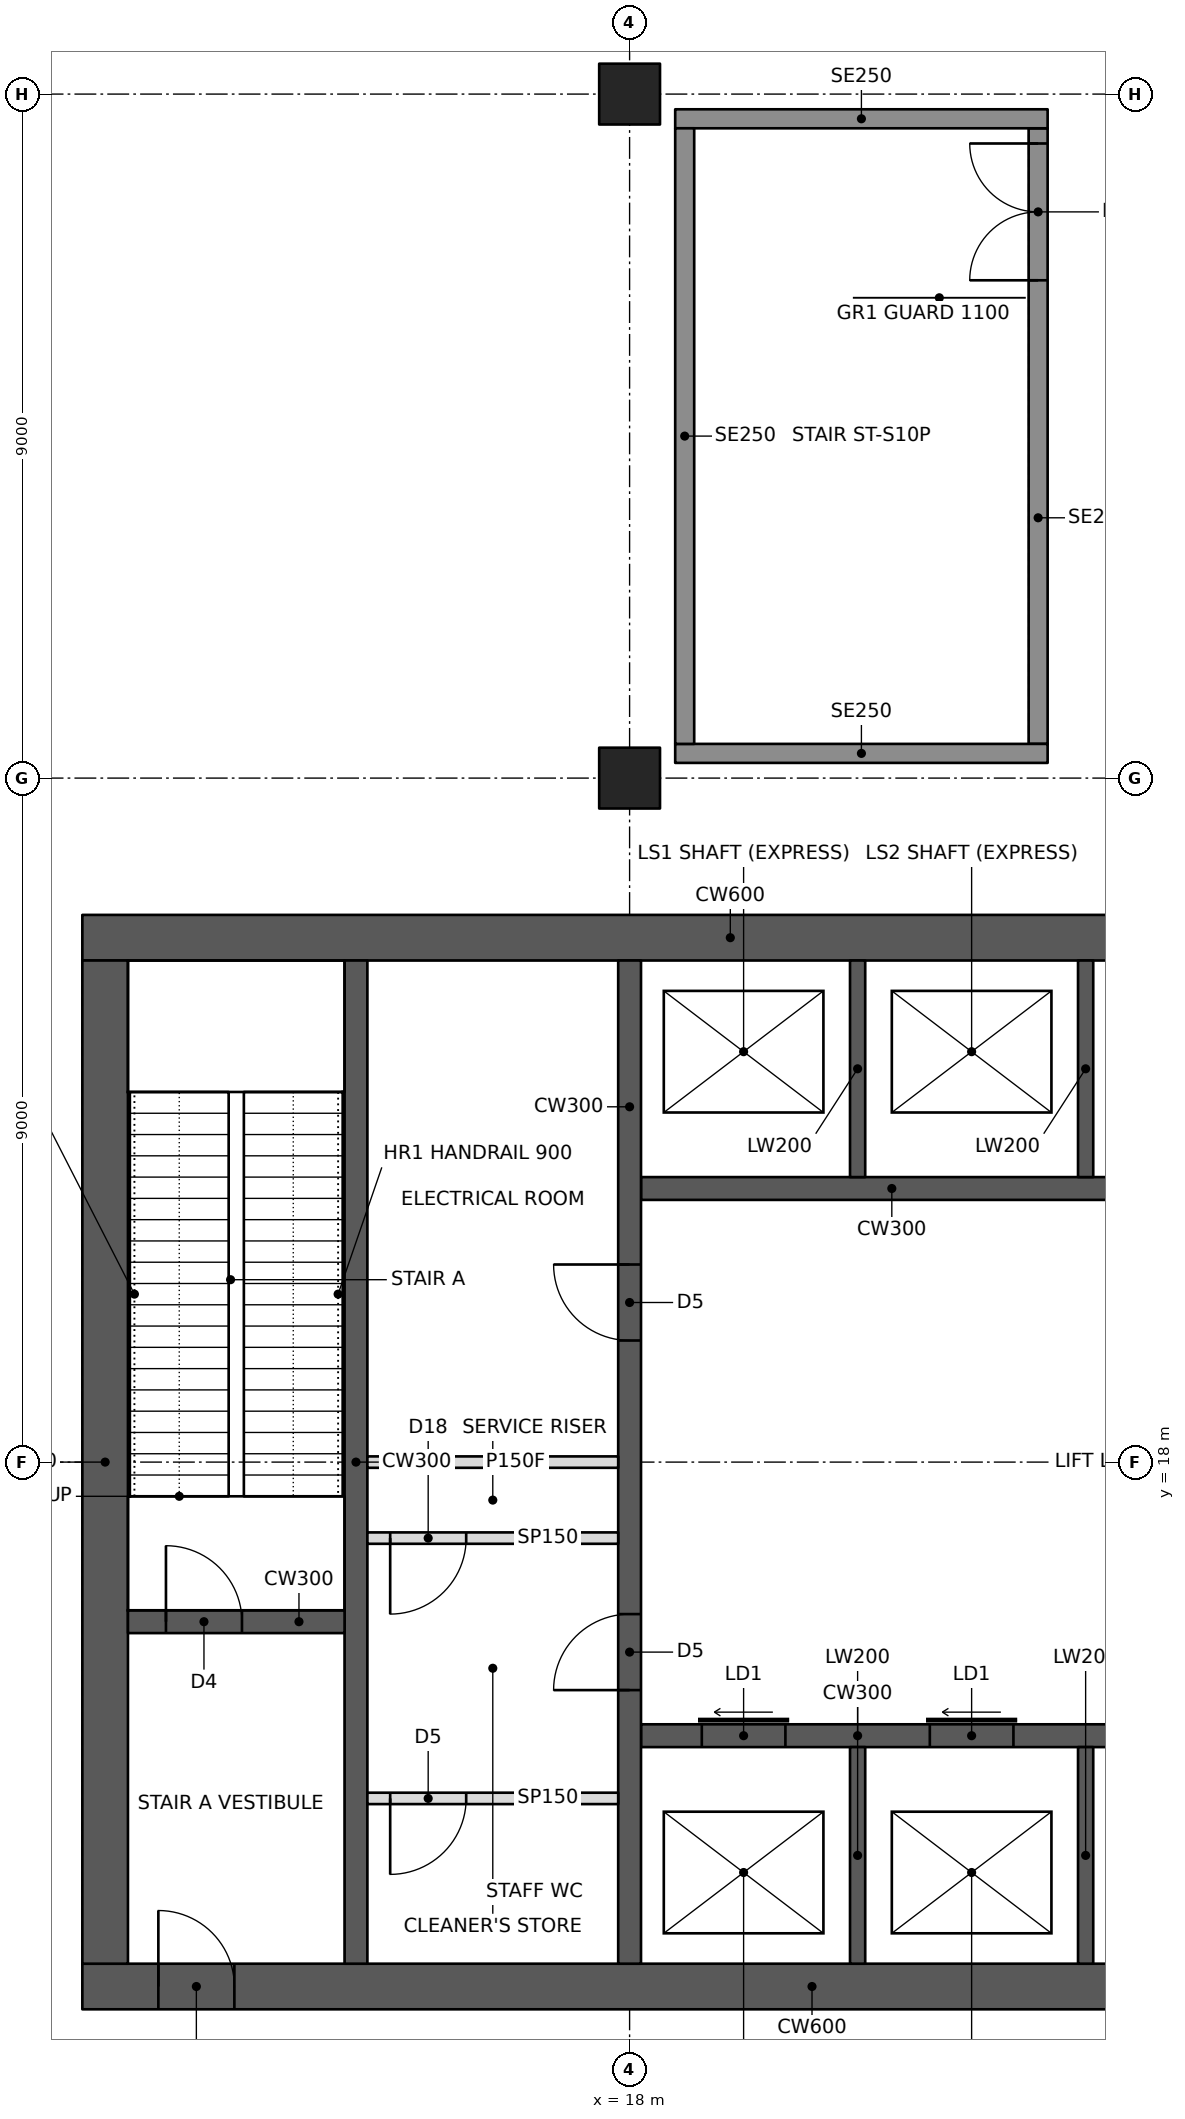
"""IFC4 building model, lengths in metres.
Left out: names, types, materials, properties, quantities, classifications, styles, units other than length and angle.
Written with IfcOpenShell. Run it as: python <this file> out.ifc"""

import sys

from ifc_helpers import new_model, si_unit, direction, frame, frame_2d, origin, origin_2d, place, context, subcontext, project, spatial, rectangle, hollow_rectangle, extrude, element, fill, save


model = new_model("IFC4")
c1 = context("Model", 3, precision=1e-05, world=origin(), true_north=direction((0.0, 1.0)))
c2 = subcontext(c1, "Body", "Model", "MODEL_VIEW")
j1 = project(units=[si_unit("LENGTHUNIT", "METRE"), si_unit("PLANEANGLEUNIT", "RADIAN")], contexts=[c1])
p1 = place(None, origin())
s1 = spatial("IfcSite", under=j1, at=p1, CompositionType="ELEMENT")
p2 = place(p1, origin())
s2 = spatial("IfcBuilding", under=s1, at=p2, CompositionType="ELEMENT")
p3 = place(p2, frame((0.0, 0.0, 16.0)))
s3 = spatial("IfcBuildingStorey", under=s2, at=p3, CompositionType="ELEMENT", Elevation=16.0)
for number, where, z_axis, x_axis in (
    (1, (18.0, 27.0, 0.0), (0.0, 0.0, 1.0), (1.0, 0.0, 0.0)),
    (2, (18.0, 36.0, 0.0), (0.0, 0.0, 1.0), (1.0, 0.0, 0.0)),
):
    element("IfcColumn", number, at=place(p3, frame(where, z_axis=z_axis, x_axis=x_axis)), inside=s3, PredefinedType="COLUMN", context=c2, shape_type="SweptSolid", body=[
        extrude(hollow_rectangle(XDim=0.8, YDim=0.8, WallThickness=0.1, at=origin_2d()), origin(), (0.0, 0.0, 1.0), 7.0),
    ])
p4 = place(p3, frame((10.8, 11.1, 0.0), z_axis=(0.0, 0.0, 1.0), x_axis=(1.0, 0.0, 0.0)))
e3 = element("IfcWall", 3, at=p4, inside=s3, PredefinedType="SHEAR", context=c2, shape_type="SweptSolid", body=[
    extrude(rectangle(XDim=23.4, YDim=0.6, at=frame_2d((11.7, 0.0))), origin(), (0.0, 0.0, 1.0), 7.0),
])
p5 = place(p4, frame((1.0, 0.0, 0.0)))
e4 = element("IfcOpeningElement", 4, at=p5, cuts=e3, PredefinedType="OPENING", context=c2, shape_type="SweptSolid", body=[
    extrude(rectangle(XDim=1.0, YDim=2.1, at=frame_2d((0.5, 1.05))), frame((0.0, 0.31, 0.0), z_axis=(0.0, -1.0, 0.0), x_axis=(1.0, 0.0, 0.0)), (0.0, 0.0, 1.0), 0.62),
])
p6 = place(p4, frame((17.2, 0.0, 0.0)))
e5 = element("IfcOpeningElement", 5, at=p6, cuts=e3, PredefinedType="OPENING", context=c2, shape_type="SweptSolid", body=[
    extrude(rectangle(XDim=1.8, YDim=2.1, at=frame_2d((0.9, 1.05))), frame((0.0, 0.31, 0.0), z_axis=(0.0, -1.0, 0.0), x_axis=(1.0, 0.0, 0.0)), (0.0, 0.0, 1.0), 0.62),
])
p7 = place(p3, frame((10.8, 24.9, 0.0), z_axis=(0.0, 0.0, 1.0), x_axis=(1.0, 0.0, 0.0)))
e6 = element("IfcWall", 6, at=p7, inside=s3, PredefinedType="SHEAR", context=c2, shape_type="SweptSolid", body=[
    extrude(rectangle(XDim=23.4, YDim=0.6, at=frame_2d((11.7, 0.0))), origin(), (0.0, 0.0, 1.0), 7.0),
])
p8 = place(p7, frame((17.2, 0.0, 0.0)))
e7 = element("IfcOpeningElement", 7, at=p8, cuts=e6, PredefinedType="OPENING", context=c2, shape_type="SweptSolid", body=[
    extrude(rectangle(XDim=1.8, YDim=2.1, at=frame_2d((0.9, 1.05))), frame((0.0, 0.31, 0.0), z_axis=(0.0, -1.0, 0.0), x_axis=(1.0, 0.0, 0.0)), (0.0, 0.0, 1.0), 0.62),
])
p9 = place(p7, frame((21.1, 0.0, 0.0)))
e8 = element("IfcOpeningElement", 8, at=p9, cuts=e6, PredefinedType="OPENING", context=c2, shape_type="SweptSolid", body=[
    extrude(rectangle(XDim=1.0, YDim=2.1, at=frame_2d((0.5, 1.05))), frame((0.0, 0.31, 0.0), z_axis=(0.0, -1.0, 0.0), x_axis=(1.0, 0.0, 0.0)), (0.0, 0.0, 1.0), 0.62),
])
p10 = place(p3, frame((11.1, 11.4, 0.0), z_axis=(0.0, 0.0, 1.0), x_axis=(0.0, 1.0, 0.0)))
e9 = element("IfcWall", 9, at=p10, inside=s3, PredefinedType="SHEAR", context=c2, shape_type="SweptSolid", body=[
    extrude(rectangle(XDim=13.2, YDim=0.6, at=frame_2d((6.6, 0.0))), origin(), (0.0, 0.0, 1.0), 7.0),
])
p11 = place(p3, frame((14.4, 11.4, 0.0), z_axis=(0.0, 0.0, 1.0), x_axis=(0.0, 1.0, 0.0)))
e10 = element("IfcWall", 10, at=p11, inside=s3, PredefinedType="SHEAR", context=c2, shape_type="SweptSolid", body=[
    extrude(rectangle(XDim=13.2, YDim=0.3, at=frame_2d((6.6, 0.0))), origin(), (0.0, 0.0, 1.0), 7.0),
])
p12 = place(p3, frame((11.4, 15.9, 0.0), z_axis=(0.0, 0.0, 1.0), x_axis=(1.0, 0.0, 0.0)))
e11 = element("IfcWall", 11, at=p12, inside=s3, PredefinedType="SHEAR", context=c2, shape_type="SweptSolid", body=[
    extrude(rectangle(XDim=2.85, YDim=0.3, at=frame_2d((1.425, 0.0))), origin(), (0.0, 0.0, 1.0), 7.0),
])
p13 = place(p12, frame((0.5, 0.0, 0.0)))
e12 = element("IfcOpeningElement", 12, at=p13, cuts=e11, PredefinedType="OPENING", context=c2, shape_type="SweptSolid", body=[
    extrude(rectangle(XDim=1.0, YDim=2.1, at=frame_2d((0.5, 1.05))), frame((0.0, 0.16, 0.0), z_axis=(0.0, -1.0, 0.0), x_axis=(1.0, 0.0, 0.0)), (0.0, 0.0, 1.0), 0.32),
])
p14 = place(p3, frame((18.0, 11.4, 0.0), z_axis=(0.0, 0.0, 1.0), x_axis=(0.0, 1.0, 0.0)))
e13 = element("IfcWall", 13, at=p14, inside=s3, PredefinedType="SHEAR", context=c2, shape_type="SweptSolid", body=[
    extrude(rectangle(XDim=13.2, YDim=0.3, at=frame_2d((6.6, 0.0))), origin(), (0.0, 0.0, 1.0), 7.0),
])
p15 = place(p14, frame((3.6, 0.0, 0.0)))
e14 = element("IfcOpeningElement", 14, at=p15, cuts=e13, PredefinedType="OPENING", context=c2, shape_type="SweptSolid", body=[
    extrude(rectangle(XDim=1.0, YDim=2.1, at=frame_2d((0.5, 1.05))), frame((0.0, 0.16, 0.0), z_axis=(0.0, -1.0, 0.0), x_axis=(1.0, 0.0, 0.0)), (0.0, 0.0, 1.0), 0.32),
])
p16 = place(p14, frame((8.2, 0.0, 0.0)))
e15 = element("IfcOpeningElement", 15, at=p16, cuts=e13, PredefinedType="OPENING", context=c2, shape_type="SweptSolid", body=[
    extrude(rectangle(XDim=1.0, YDim=2.1, at=frame_2d((0.5, 1.05))), frame((0.0, 0.16, 0.0), z_axis=(0.0, -1.0, 0.0), x_axis=(1.0, 0.0, 0.0)), (0.0, 0.0, 1.0), 0.32),
])
p17 = place(p3, frame((14.55, 18.0, 0.0), z_axis=(0.0, 0.0, 1.0), x_axis=(1.0, 0.0, 0.0)))
e16 = element("IfcWall", 16, at=p17, inside=s3, PredefinedType="PARTITIONING", context=c2, shape_type="SweptSolid", body=[
    extrude(rectangle(XDim=3.3, YDim=0.15, at=frame_2d((1.65, 0.0))), origin(), (0.0, 0.0, 1.0), 6.7),
])
p18 = place(p3, frame((18.15, 14.4, 0.0), z_axis=(0.0, 0.0, 1.0), x_axis=(1.0, 0.0, 0.0)))
e17 = element("IfcWall", 17, at=p18, inside=s3, PredefinedType="SHEAR", context=c2, shape_type="SweptSolid", body=[
    extrude(rectangle(XDim=9.0, YDim=0.3, at=frame_2d((4.5, 0.0))), origin(), (0.0, 0.0, 1.0), 7.0),
])
p19 = place(p18, frame((0.8, 0.0, 0.0)))
e18 = element("IfcOpeningElement", 18, at=p19, cuts=e17, PredefinedType="OPENING", context=c2, shape_type="SweptSolid", body=[
    extrude(rectangle(XDim=1.1, YDim=2.1, at=frame_2d((0.55, 1.05))), frame((0.0, 0.16, 0.0), z_axis=(0.0, -1.0, 0.0), x_axis=(1.0, 0.0, 0.0)), (0.0, 0.0, 1.0), 0.32),
])
p20 = place(p18, frame((3.8, 0.0, 0.0)))
e19 = element("IfcOpeningElement", 19, at=p20, cuts=e17, PredefinedType="OPENING", context=c2, shape_type="SweptSolid", body=[
    extrude(rectangle(XDim=1.1, YDim=2.1, at=frame_2d((0.55, 1.05))), frame((0.0, 0.16, 0.0), z_axis=(0.0, -1.0, 0.0), x_axis=(1.0, 0.0, 0.0)), (0.0, 0.0, 1.0), 0.32),
])
p21 = place(p18, frame((6.75, 0.0, 0.0)))
e20 = element("IfcOpeningElement", 20, at=p21, cuts=e17, PredefinedType="OPENING", context=c2, shape_type="SweptSolid", body=[
    extrude(rectangle(XDim=1.2, YDim=2.1, at=frame_2d((0.6, 1.05))), frame((0.0, 0.16, 0.0), z_axis=(0.0, -1.0, 0.0), x_axis=(1.0, 0.0, 0.0)), (0.0, 0.0, 1.0), 0.32),
])
for number, where, z_axis, x_axis in (
    (21, (21.0, 11.4, 0.0), (0.0, 0.0, 1.0), (0.0, 1.0, 0.0)),
    (22, (24.0, 11.4, 0.0), (0.0, 0.0, 1.0), (0.0, 1.0, 0.0)),
):
    element("IfcWall", number, at=place(p3, frame(where, z_axis=z_axis, x_axis=x_axis)), inside=s3, PredefinedType="SHEAR", context=c2, shape_type="SweptSolid", body=[
        extrude(rectangle(XDim=2.85, YDim=0.2, at=frame_2d((1.425, 0.0))), origin(), (0.0, 0.0, 1.0), 7.0),
    ])
p22 = place(p3, frame((18.15, 21.6, 0.0), z_axis=(0.0, 0.0, 1.0), x_axis=(1.0, 0.0, 0.0)))
e23 = element("IfcWall", 23, at=p22, inside=s3, PredefinedType="SHEAR", context=c2, shape_type="SweptSolid", body=[
    extrude(rectangle(XDim=9.0, YDim=0.3, at=frame_2d((4.5, 0.0))), origin(), (0.0, 0.0, 1.0), 7.0),
])
p23 = place(p22, frame((6.75, 0.0, 0.0)))
e24 = element("IfcOpeningElement", 24, at=p23, cuts=e23, PredefinedType="OPENING", context=c2, shape_type="SweptSolid", body=[
    extrude(rectangle(XDim=1.2, YDim=2.1, at=frame_2d((0.6, 1.05))), frame((0.0, 0.16, 0.0), z_axis=(0.0, -1.0, 0.0), x_axis=(1.0, 0.0, 0.0)), (0.0, 0.0, 1.0), 0.32),
])
for number, where, z_axis, x_axis in (
    (25, (21.0, 21.75, 0.0), (0.0, 0.0, 1.0), (0.0, 1.0, 0.0)),
    (26, (24.0, 21.75, 0.0), (0.0, 0.0, 1.0), (0.0, 1.0, 0.0)),
):
    element("IfcWall", number, at=place(p3, frame(where, z_axis=z_axis, x_axis=x_axis)), inside=s3, PredefinedType="SHEAR", context=c2, shape_type="SweptSolid", body=[
        extrude(rectangle(XDim=2.85, YDim=0.2, at=frame_2d((1.425, 0.0))), origin(), (0.0, 0.0, 1.0), 7.0),
    ])
p24 = place(p3, frame((14.55, 17.0, 0.0), z_axis=(0.0, 0.0, 1.0), x_axis=(1.0, 0.0, 0.0)))
e27 = element("IfcWall", 27, at=p24, inside=s3, PredefinedType="PARTITIONING", context=c2, shape_type="SweptSolid", body=[
    extrude(rectangle(XDim=3.3, YDim=0.15, at=frame_2d((1.65, 0.0))), origin(), (0.0, 0.0, 1.0), 6.7),
])
p25 = place(p24, frame((0.3, 0.0, 0.0)))
e28 = element("IfcOpeningElement", 28, at=p25, cuts=e27, PredefinedType="OPENING", context=c2, shape_type="SweptSolid", body=[
    extrude(rectangle(XDim=1.0, YDim=2.1, at=frame_2d((0.5, 1.05))), frame((0.0, 0.085, 0.0), z_axis=(0.0, -1.0, 0.0), x_axis=(1.0, 0.0, 0.0)), (0.0, 0.0, 1.0), 0.17),
])
p26 = place(p3, frame((14.55, 13.575, 0.0), z_axis=(0.0, 0.0, 1.0), x_axis=(1.0, 0.0, 0.0)))
e29 = element("IfcWall", 29, at=p26, inside=s3, PredefinedType="PARTITIONING", context=c2, shape_type="SweptSolid", body=[
    extrude(rectangle(XDim=3.3, YDim=0.15, at=frame_2d((1.65, 0.0))), origin(), (0.0, 0.0, 1.0), 6.7),
])
p27 = place(p26, frame((0.3, 0.0, 0.0)))
e30 = element("IfcOpeningElement", 30, at=p27, cuts=e29, PredefinedType="OPENING", context=c2, shape_type="SweptSolid", body=[
    extrude(rectangle(XDim=1.0, YDim=2.1, at=frame_2d((0.5, 1.05))), frame((0.0, 0.085, 0.0), z_axis=(0.0, -1.0, 0.0), x_axis=(1.0, 0.0, 0.0)), (0.0, 0.0, 1.0), 0.17),
])
for number, where, z_axis, x_axis in (
    (31, (18.6, 27.325, 0.0), (0.0, 0.0, 1.0), (1.0, 0.0, 0.0)),
    (32, (18.6, 35.675, 0.0), (0.0, 0.0, 1.0), (1.0, 0.0, 0.0)),
):
    element("IfcWall", number, at=place(p3, frame(where, z_axis=z_axis, x_axis=x_axis)), inside=s3, PredefinedType="SOLIDWALL", context=c2, shape_type="SweptSolid", body=[
        extrude(rectangle(XDim=4.9, YDim=0.25, at=frame_2d((2.45, 0.0))), origin(), (0.0, 0.0, 1.0), 6.7),
    ])
p28 = place(p3, frame((18.725, 27.45, 0.0), z_axis=(0.0, 0.0, 1.0), x_axis=(0.0, 1.0, 0.0)))
e33 = element("IfcWall", 33, at=p28, inside=s3, PredefinedType="SOLIDWALL", context=c2, shape_type="SweptSolid", body=[
    extrude(rectangle(XDim=8.1, YDim=0.25, at=frame_2d((4.05, 0.0))), origin(), (0.0, 0.0, 1.0), 6.7),
])
p29 = place(p3, frame((23.375, 27.45, 0.0), z_axis=(0.0, 0.0, 1.0), x_axis=(0.0, 1.0, 0.0)))
e34 = element("IfcWall", 34, at=p29, inside=s3, PredefinedType="SOLIDWALL", context=c2, shape_type="SweptSolid", body=[
    extrude(rectangle(XDim=8.1, YDim=0.25, at=frame_2d((4.05, 0.0))), origin(), (0.0, 0.0, 1.0), 6.7),
])
p30 = place(p29, frame((6.1, 0.0, 0.0)))
e35 = element("IfcOpeningElement", 35, at=p30, cuts=e34, PredefinedType="OPENING", context=c2, shape_type="SweptSolid", body=[
    extrude(rectangle(XDim=1.8, YDim=2.1, at=frame_2d((0.9, 1.05))), frame((0.0, 0.135, 0.0), z_axis=(0.0, -1.0, 0.0), x_axis=(1.0, 0.0, 0.0)), (0.0, 0.0, 1.0), 0.27),
])
p31 = place(p25, frame((1.0, 0.0, 0.0), z_axis=(0.0, 0.0, 1.0), x_axis=(-1.0, 0.0, 0.0)))
e36 = element("IfcDoor", 36, at=p31, inside=s3, OperationType="SINGLE_SWING_RIGHT", PredefinedType="DOOR", context=c2, shape_type="SweptSolid", body=[
    extrude(rectangle(XDim=1.0, YDim=2.1, at=frame_2d((0.5, 1.05))), frame((0.0, 0.025, 0.0), z_axis=(0.0, -1.0, 0.0), x_axis=(1.0, 0.0, 0.0)), (0.0, 0.0, 1.0), 0.05),
])
fill(e28, e36)
p32 = place(p27, frame((1.0, 0.0, 0.0), z_axis=(0.0, 0.0, 1.0), x_axis=(-1.0, 0.0, 0.0)))
e37 = element("IfcDoor", 37, at=p32, inside=s3, OperationType="SINGLE_SWING_RIGHT", PredefinedType="DOOR", context=c2, shape_type="SweptSolid", body=[
    extrude(rectangle(XDim=1.0, YDim=2.1, at=frame_2d((0.5, 1.05))), frame((0.0, 0.025, 0.0), z_axis=(0.0, -1.0, 0.0), x_axis=(1.0, 0.0, 0.0)), (0.0, 0.0, 1.0), 0.05),
])
fill(e30, e37)
p33 = place(p5, origin())
e38 = element("IfcDoor", 38, at=p33, inside=s3, OperationType="SINGLE_SWING_LEFT", PredefinedType="DOOR", context=c2, shape_type="SweptSolid", body=[
    extrude(rectangle(XDim=1.0, YDim=2.1, at=frame_2d((0.5, 1.05))), frame((0.0, 0.025, 0.0), z_axis=(0.0, -1.0, 0.0), x_axis=(1.0, 0.0, 0.0)), (0.0, 0.0, 1.0), 0.05),
])
fill(e4, e38)
p34 = place(p13, origin())
e39 = element("IfcDoor", 39, at=p34, inside=s3, OperationType="SINGLE_SWING_LEFT", PredefinedType="DOOR", context=c2, shape_type="SweptSolid", body=[
    extrude(rectangle(XDim=1.0, YDim=2.1, at=frame_2d((0.5, 1.05))), frame((0.0, 0.025, 0.0), z_axis=(0.0, -1.0, 0.0), x_axis=(1.0, 0.0, 0.0)), (0.0, 0.0, 1.0), 0.05),
])
fill(e12, e39)
p35 = place(p15, origin())
e40 = element("IfcDoor", 40, at=p35, inside=s3, OperationType="SINGLE_SWING_LEFT", PredefinedType="DOOR", context=c2, shape_type="SweptSolid", body=[
    extrude(rectangle(XDim=1.0, YDim=2.1, at=frame_2d((0.5, 1.05))), frame((0.0, 0.025, 0.0), z_axis=(0.0, -1.0, 0.0), x_axis=(1.0, 0.0, 0.0)), (0.0, 0.0, 1.0), 0.05),
])
fill(e14, e40)
p36 = place(p16, origin())
e41 = element("IfcDoor", 41, at=p36, inside=s3, OperationType="SINGLE_SWING_RIGHT", PredefinedType="DOOR", context=c2, shape_type="SweptSolid", body=[
    extrude(rectangle(XDim=1.0, YDim=2.1, at=frame_2d((0.5, 1.05))), frame((0.0, 0.025, 0.0), z_axis=(0.0, -1.0, 0.0), x_axis=(1.0, 0.0, 0.0)), (0.0, 0.0, 1.0), 0.05),
])
fill(e15, e41)
p37 = place(p19, origin())
e42 = element("IfcDoor", 42, at=p37, inside=s3, OperationType="SLIDING_TO_LEFT", PredefinedType="DOOR", context=c2, shape_type="SweptSolid", body=[
    extrude(rectangle(XDim=1.1, YDim=2.1, at=frame_2d((0.55, 1.05))), frame((0.0, 0.025, 0.0), z_axis=(0.0, -1.0, 0.0), x_axis=(1.0, 0.0, 0.0)), (0.0, 0.0, 1.0), 0.05),
])
fill(e18, e42)
p38 = place(p20, origin())
e43 = element("IfcDoor", 43, at=p38, inside=s3, OperationType="SLIDING_TO_LEFT", PredefinedType="DOOR", context=c2, shape_type="SweptSolid", body=[
    extrude(rectangle(XDim=1.1, YDim=2.1, at=frame_2d((0.55, 1.05))), frame((0.0, 0.025, 0.0), z_axis=(0.0, -1.0, 0.0), x_axis=(1.0, 0.0, 0.0)), (0.0, 0.0, 1.0), 0.05),
])
fill(e19, e43)
p39 = place(p30, origin())
e44 = element("IfcDoor", 44, at=p39, inside=s3, OperationType="DOUBLE_DOOR_SINGLE_SWING", PredefinedType="DOOR", context=c2, shape_type="SweptSolid", body=[
    extrude(rectangle(XDim=1.8, YDim=2.1, at=frame_2d((0.9, 1.05))), frame((0.0, 0.025, 0.0), z_axis=(0.0, -1.0, 0.0), x_axis=(1.0, 0.0, 0.0)), (0.0, 0.0, 1.0), 0.05),
])
fill(e35, e44)
save(model, sys.argv[1])
